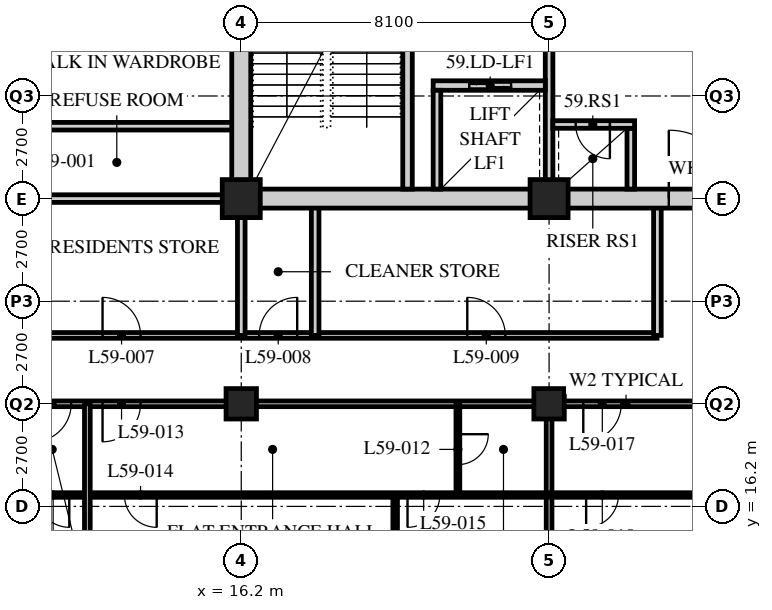
"""IFC4 building model, lengths in metres.
Left out: names, types, materials, properties, quantities, classifications, styles, units other than length and angle.
Written with IfcOpenShell. Run it as: python <this file> out.ifc"""

import sys

from ifc_helpers import new_model, si_unit, direction, frame, frame_2d, origin, origin_2d, place, context, subcontext, project, spatial, rectangle, hollow_rectangle, extrude, element, fill, save


model = new_model("IFC4")
c1 = context("Model", 3, precision=1e-05, world=origin(), true_north=direction((0.0, 1.0)))
c2 = subcontext(c1, "Body", "Model", "MODEL_VIEW")
j1 = project(units=[si_unit("LENGTHUNIT", "METRE"), si_unit("PLANEANGLEUNIT", "RADIAN")], contexts=[c1])
p1 = place(None, origin())
s1 = spatial("IfcSite", under=j1, at=p1, CompositionType="ELEMENT")
p2 = place(p1, origin())
s2 = spatial("IfcBuilding", under=s1, at=p2, CompositionType="ELEMENT")
p3 = place(p2, frame((0.0, 0.0, 228.0)))
s3 = spatial("IfcBuildingStorey", under=s2, at=p3, CompositionType="ELEMENT", Elevation=228.0)
p4 = place(p3, frame((16.2, 18.9, 0.0), z_axis=(0.0, 0.0, 1.0), x_axis=(1.0, 0.0, 0.0)))
e1 = element("IfcColumn", 1, at=p4, inside=s3, PredefinedType="COLUMN", context=c2, shape_type="SweptSolid", body=[
    extrude(hollow_rectangle(XDim=0.8, YDim=0.8, WallThickness=0.08, at=origin_2d()), origin(), (0.0, 0.0, 1.0), 3.6),
])
p5 = place(p3, frame((16.2, 24.3, 0.0), z_axis=(0.0, 0.0, 1.0), x_axis=(1.0, 0.0, 0.0)))
e2 = element("IfcColumn", 2, at=p5, inside=s3, PredefinedType="COLUMN", context=c2, shape_type="SweptSolid", body=[
    extrude(hollow_rectangle(XDim=1.0, YDim=1.0, WallThickness=0.1, at=origin_2d()), origin(), (0.0, 0.0, 1.0), 3.6),
])
p6 = place(p3, frame((24.3, 18.9, 0.0), z_axis=(0.0, 0.0, 1.0), x_axis=(1.0, 0.0, 0.0)))
e3 = element("IfcColumn", 3, at=p6, inside=s3, PredefinedType="COLUMN", context=c2, shape_type="SweptSolid", body=[
    extrude(hollow_rectangle(XDim=0.8, YDim=0.8, WallThickness=0.08, at=origin_2d()), origin(), (0.0, 0.0, 1.0), 3.6),
])
p7 = place(p3, frame((24.3, 24.3, 0.0), z_axis=(0.0, 0.0, 1.0), x_axis=(1.0, 0.0, 0.0)))
e4 = element("IfcColumn", 4, at=p7, inside=s3, PredefinedType="COLUMN", context=c2, shape_type="SweptSolid", body=[
    extrude(hollow_rectangle(XDim=1.0, YDim=1.0, WallThickness=0.1, at=origin_2d()), origin(), (0.0, 0.0, 1.0), 3.6),
])
p8 = place(p3, frame((8.1, 18.9, 0.0), z_axis=(0.0, 0.0, 1.0), x_axis=(1.0, 0.0, 0.0)))
e5 = element("IfcWall", 5, at=p8, inside=s3, PredefinedType="PARTITIONING", context=c2, shape_type="SweptSolid", body=[
    extrude(rectangle(XDim=36.45, YDim=0.15, at=frame_2d((18.225, 0.0))), origin(), (0.0, 0.0, 1.0), 2.628),
])
p9 = place(p8, frame((4.45, 0.0, 0.0)))
e6 = element("IfcOpeningElement", 6, at=p9, cuts=e5, PredefinedType="OPENING", context=c2, shape_type="SweptSolid", body=[
    extrude(rectangle(XDim=1.0, YDim=2.1, at=frame_2d((0.5, 1.05))), frame((0.0, 0.085, 0.0), z_axis=(0.0, -1.0, 0.0), x_axis=(1.0, 0.0, 0.0)), (0.0, 0.0, 1.0), 0.17),
])
p10 = place(p8, frame((17.1, 0.0, 0.0)))
e7 = element("IfcOpeningElement", 7, at=p10, cuts=e5, PredefinedType="OPENING", context=c2, shape_type="SweptSolid", body=[
    extrude(rectangle(XDim=1.0, YDim=2.1, at=frame_2d((0.5, 1.05))), frame((0.0, 0.085, 0.0), z_axis=(0.0, -1.0, 0.0), x_axis=(1.0, 0.0, 0.0)), (0.0, 0.0, 1.0), 0.17),
])
p11 = place(p8, frame((29.05, 0.0, 0.0)))
e8 = element("IfcOpeningElement", 8, at=p11, cuts=e5, PredefinedType="OPENING", context=c2, shape_type="SweptSolid", body=[
    extrude(rectangle(XDim=1.0, YDim=2.1, at=frame_2d((0.5, 1.05))), frame((0.0, 0.085, 0.0), z_axis=(0.0, -1.0, 0.0), x_axis=(1.0, 0.0, 0.0)), (0.0, 0.0, 1.0), 0.17),
])
p12 = place(p8, frame((2.625, 0.0, 0.0)))
e9 = element("IfcOpeningElement", 9, at=p12, cuts=e5, PredefinedType="OPENING", context=c2, shape_type="SweptSolid", body=[
    extrude(rectangle(XDim=1.0, YDim=2.1, at=frame_2d((0.5, 1.05))), frame((0.0, 0.085, 0.0), z_axis=(0.0, -1.0, 0.0), x_axis=(1.0, 0.0, 0.0)), (0.0, 0.0, 1.0), 0.17),
])
p13 = place(p8, frame((33.925, 0.0, 0.0)))
e10 = element("IfcOpeningElement", 10, at=p13, cuts=e5, PredefinedType="OPENING", context=c2, shape_type="SweptSolid", body=[
    extrude(rectangle(XDim=1.0, YDim=2.1, at=frame_2d((0.5, 1.05))), frame((0.0, 0.085, 0.0), z_axis=(0.0, -1.0, 0.0), x_axis=(1.0, 0.0, 0.0)), (0.0, 0.0, 1.0), 0.17),
])
p14 = place(p3, frame((9.9, 20.7, 0.0), z_axis=(0.0, 0.0, 1.0), x_axis=(1.0, 0.0, 0.0)))
e11 = element("IfcWall", 11, at=p14, inside=s3, PredefinedType="PARTITIONING", context=c2, shape_type="SweptSolid", body=[
    extrude(rectangle(XDim=17.24, YDim=0.15, at=frame_2d((8.62, 0.0))), origin(), (0.0, 0.0, 1.0), 3.39),
])
p15 = place(p14, frame((2.65, 0.0, 0.0)))
e12 = element("IfcOpeningElement", 12, at=p15, cuts=e11, PredefinedType="OPENING", context=c2, shape_type="SweptSolid", body=[
    extrude(rectangle(XDim=1.0, YDim=2.1, at=frame_2d((0.5, 1.05))), frame((0.0, 0.085, 0.0), z_axis=(0.0, -1.0, 0.0), x_axis=(1.0, 0.0, 0.0)), (0.0, 0.0, 1.0), 0.17),
])
p16 = place(p14, frame((6.772, 0.0, 0.0)))
e13 = element("IfcOpeningElement", 13, at=p16, cuts=e11, PredefinedType="OPENING", context=c2, shape_type="SweptSolid", body=[
    extrude(rectangle(XDim=1.0, YDim=2.1, at=frame_2d((0.5, 1.05))), frame((0.0, 0.085, 0.0), z_axis=(0.0, -1.0, 0.0), x_axis=(1.0, 0.0, 0.0)), (0.0, 0.0, 1.0), 0.17),
])
p17 = place(p14, frame((12.247, 0.0, 0.0)))
e14 = element("IfcOpeningElement", 14, at=p17, cuts=e11, PredefinedType="OPENING", context=c2, shape_type="SweptSolid", body=[
    extrude(rectangle(XDim=1.0, YDim=2.1, at=frame_2d((0.5, 1.05))), frame((0.0, 0.085, 0.0), z_axis=(0.0, -1.0, 0.0), x_axis=(1.0, 0.0, 0.0)), (0.0, 0.0, 1.0), 0.17),
])
p18 = place(p3, frame((9.9, 26.205, 0.0), z_axis=(0.0, 0.0, 1.0), x_axis=(1.0, 0.0, 0.0)))
e15 = element("IfcWall", 15, at=p18, inside=s3, PredefinedType="SOLIDWALL", context=c2, shape_type="SweptSolid", body=[
    extrude(rectangle(XDim=6.3, YDim=0.2, at=frame_2d((3.15, 0.0))), origin(), (0.0, 0.0, 1.0), 3.39),
])
p19 = place(p3, frame((16.2, 20.7, 0.0), z_axis=(0.0, 0.0, 1.0), x_axis=(0.0, 1.0, 0.0)))
e16 = element("IfcWall", 16, at=p19, inside=s3, PredefinedType="SOLIDWALL", context=c2, shape_type="SweptSolid", body=[
    extrude(rectangle(XDim=3.6, YDim=0.2, at=frame_2d((1.8, 0.0))), origin(), (0.0, 0.0, 1.0), 2.628),
])
for number, where, z_axis, x_axis in (
    (17, (18.144, 20.7, 0.0), (0.0, 0.0, 1.0), (0.0, 1.0, 0.0)),
    (18, (27.15, 20.7, 0.0), (0.0, 0.0, 1.0), (0.0, 1.0, 0.0)),
):
    element("IfcWall", number, at=place(p3, frame(where, z_axis=z_axis, x_axis=x_axis)), inside=s3, PredefinedType="SOLIDWALL", context=c2, shape_type="SweptSolid", body=[
        extrude(rectangle(XDim=3.6, YDim=0.2, at=frame_2d((1.8, 0.0))), origin(), (0.0, 0.0, 1.0), 3.39),
    ])
p20 = place(p3, frame((9.9, 24.3, 0.0), z_axis=(0.0, 0.0, 1.0), x_axis=(1.0, 0.0, 0.0)))
e19 = element("IfcWall", 19, at=p20, inside=s3, PredefinedType="SOLIDWALL", context=c2, shape_type="SweptSolid", body=[
    extrude(rectangle(XDim=6.3, YDim=0.2, at=frame_2d((3.15, 0.0))), origin(), (0.0, 0.0, 1.0), 3.39),
])
p21 = place(p3, frame((21.9, 18.9, 0.0), z_axis=(0.0, 0.0, 1.0), x_axis=(0.0, -1.0, 0.0)))
e20 = element("IfcWall", 20, at=p21, inside=s3, PredefinedType="PARTITIONING", context=c2, shape_type="SweptSolid", body=[
    extrude(rectangle(XDim=2.4, YDim=0.1, at=frame_2d((1.2, 0.0))), origin(), (0.0, 0.0, 1.0), 3.39),
])
p22 = place(p21, frame((0.8, 0.0, 0.0)))
e21 = element("IfcOpeningElement", 21, at=p22, cuts=e20, PredefinedType="OPENING", context=c2, shape_type="SweptSolid", body=[
    extrude(rectangle(XDim=0.8, YDim=2.1, at=frame_2d((0.4, 1.05))), frame((0.0, 0.06, 0.0), z_axis=(0.0, -1.0, 0.0), x_axis=(1.0, 0.0, 0.0)), (0.0, 0.0, 1.0), 0.12),
])
p23 = place(p3, frame((20.25, 16.5, 0.0), z_axis=(0.0, 0.0, 1.0), x_axis=(0.0, -1.0, 0.0)))
e22 = element("IfcWall", 22, at=p23, inside=s3, PredefinedType="PARTITIONING", context=c2, shape_type="SweptSolid", body=[
    extrude(rectangle(XDim=5.4, YDim=0.12, at=frame_2d((2.7, 0.0))), origin(), (0.0, 0.0, 1.0), 3.39),
])
p24 = place(p3, frame((24.3, 18.9, 0.0), z_axis=(0.0, 0.0, 1.0), x_axis=(0.0, -1.0, 0.0)))
e23 = element("IfcWall", 23, at=p24, inside=s3, PredefinedType="PARTITIONING", context=c2, shape_type="SweptSolid", body=[
    extrude(rectangle(XDim=7.8, YDim=0.15, at=frame_2d((3.9, 0.0))), origin(), (0.0, 0.0, 1.0), 2.628),
])
p25 = place(p3, frame((8.1, 16.5, 0.0), z_axis=(0.0, 0.0, 1.0), x_axis=(1.0, 0.0, 0.0)))
e24 = element("IfcWall", 24, at=p25, inside=s3, PredefinedType="PARTITIONING", context=c2, shape_type="SweptSolid", body=[
    extrude(rectangle(XDim=28.35, YDim=0.12, at=frame_2d((14.175, 0.0))), origin(), (0.0, 0.0, 1.0), 3.39),
])
p26 = place(p25, frame((5.025, 0.0, 0.0)))
e25 = element("IfcOpeningElement", 25, at=p26, cuts=e24, PredefinedType="OPENING", context=c2, shape_type="SweptSolid", body=[
    extrude(rectangle(XDim=0.85, YDim=2.1, at=frame_2d((0.425, 1.05))), frame((0.0, 0.07, 0.0), z_axis=(0.0, -1.0, 0.0), x_axis=(1.0, 0.0, 0.0)), (0.0, 0.0, 1.0), 0.14),
])
p27 = place(p25, frame((12.475, 0.0, 0.0)))
e26 = element("IfcOpeningElement", 26, at=p27, cuts=e24, PredefinedType="OPENING", context=c2, shape_type="SweptSolid", body=[
    extrude(rectangle(XDim=0.85, YDim=2.1, at=frame_2d((0.425, 1.05))), frame((0.0, 0.07, 0.0), z_axis=(0.0, -1.0, 0.0), x_axis=(1.0, 0.0, 0.0)), (0.0, 0.0, 1.0), 0.14),
])
p28 = place(p25, frame((17.175, 0.0, 0.0)))
e27 = element("IfcOpeningElement", 27, at=p28, cuts=e24, PredefinedType="OPENING", context=c2, shape_type="SweptSolid", body=[
    extrude(rectangle(XDim=0.85, YDim=2.1, at=frame_2d((0.425, 1.05))), frame((0.0, 0.07, 0.0), z_axis=(0.0, -1.0, 0.0), x_axis=(1.0, 0.0, 0.0)), (0.0, 0.0, 1.0), 0.14),
])
p29 = place(p25, frame((24.625, 0.0, 0.0)))
e28 = element("IfcOpeningElement", 28, at=p29, cuts=e24, PredefinedType="OPENING", context=c2, shape_type="SweptSolid", body=[
    extrude(rectangle(XDim=0.85, YDim=2.1, at=frame_2d((0.425, 1.05))), frame((0.0, 0.07, 0.0), z_axis=(0.0, -1.0, 0.0), x_axis=(1.0, 0.0, 0.0)), (0.0, 0.0, 1.0), 0.14),
])
p30 = place(p25, frame((2.725, 0.0, 0.0)))
e29 = element("IfcOpeningElement", 29, at=p30, cuts=e24, PredefinedType="OPENING", context=c2, shape_type="SweptSolid", body=[
    extrude(rectangle(XDim=0.85, YDim=2.1, at=frame_2d((0.425, 1.05))), frame((0.0, 0.07, 0.0), z_axis=(0.0, -1.0, 0.0), x_axis=(1.0, 0.0, 0.0)), (0.0, 0.0, 1.0), 0.14),
])
p31 = place(p3, frame((12.15, 18.9, 0.0), z_axis=(0.0, 0.0, 1.0), x_axis=(0.0, -1.0, 0.0)))
e30 = element("IfcWall", 30, at=p31, inside=s3, PredefinedType="PARTITIONING", context=c2, shape_type="SweptSolid", body=[
    extrude(rectangle(XDim=7.8, YDim=0.15, at=frame_2d((3.9, 0.0))), origin(), (0.0, 0.0, 1.0), 3.39),
])
p32 = place(p3, frame((15.95, 24.3, 0.0), z_axis=(0.0, 0.0, 1.0), x_axis=(1.0, 0.0, 0.0)))
e31 = element("IfcWall", 31, at=p32, inside=s3, PredefinedType="SOLIDWALL", context=c2, shape_type="SweptSolid", body=[
    extrude(rectangle(XDim=24.8, YDim=0.5, at=frame_2d((12.4, 0.0))), origin(), (0.0, 0.0, 1.0), 2.628),
])
p33 = place(p32, frame((11.5, 0.0, 0.0)))
e32 = element("IfcOpeningElement", 32, at=p33, cuts=e31, PredefinedType="OPENING", context=c2, shape_type="SweptSolid", body=[
    extrude(rectangle(XDim=1.8, YDim=2.4, at=frame_2d((0.9, 1.2))), frame((0.0, 0.26, 0.0), z_axis=(0.0, -1.0, 0.0), x_axis=(1.0, 0.0, 0.0)), (0.0, 0.0, 1.0), 0.52),
])
p34 = place(p3, frame((16.2, 24.55, 0.0), z_axis=(0.0, 0.0, 1.0), x_axis=(0.0, 1.0, 0.0)))
e33 = element("IfcWall", 33, at=p34, inside=s3, PredefinedType="SOLIDWALL", context=c2, shape_type="SweptSolid", body=[
    extrude(rectangle(XDim=15.7, YDim=0.5, at=frame_2d((7.85, 0.0))), origin(), (0.0, 0.0, 1.0), 2.628),
])
p35 = place(p3, frame((24.3, 24.55, 0.0), z_axis=(0.0, 0.0, 1.0), x_axis=(0.0, 1.0, 0.0)))
e34 = element("IfcWall", 34, at=p35, inside=s3, PredefinedType="SOLIDWALL", context=c2, shape_type="SweptSolid", body=[
    extrude(rectangle(XDim=7.75, YDim=0.2, at=frame_2d((3.875, 0.0))), origin(), (0.0, 0.0, 1.0), 2.778),
])
p36 = place(p35, frame((4.6, 0.0, 0.0)))
e35 = element("IfcOpeningElement", 35, at=p36, cuts=e34, PredefinedType="OPENING", context=c2, shape_type="SweptSolid", body=[
    extrude(rectangle(XDim=1.2, YDim=2.1, at=frame_2d((0.6, 1.05))), frame((0.0, 0.11, 0.0), z_axis=(0.0, -1.0, 0.0), x_axis=(1.0, 0.0, 0.0)), (0.0, 0.0, 1.0), 0.22),
])
p37 = place(p3, frame((20.575, 24.55, 0.0), z_axis=(0.0, 0.0, 1.0), x_axis=(0.0, 1.0, 0.0)))
e36 = element("IfcWall", 36, at=p37, inside=s3, PredefinedType="SOLIDWALL", context=c2, shape_type="SweptSolid", body=[
    extrude(rectangle(XDim=7.75, YDim=0.25, at=frame_2d((3.875, 0.0))), origin(), (0.0, 0.0, 1.0), 3.39),
])
p38 = place(p37, frame((6.2, 0.0, 0.0)))
e37 = element("IfcOpeningElement", 37, at=p38, cuts=e36, PredefinedType="OPENING", context=c2, shape_type="SweptSolid", body=[
    extrude(rectangle(XDim=1.2, YDim=2.1, at=frame_2d((0.6, 1.05))), frame((0.0, 0.135, 0.0), z_axis=(0.0, -1.0, 0.0), x_axis=(1.0, 0.0, 0.0)), (0.0, 0.0, 1.0), 0.27),
])
p39 = place(p3, frame((21.25, 27.275, 0.0), z_axis=(0.0, 0.0, 1.0), x_axis=(1.0, 0.0, 0.0)))
e38 = element("IfcWall", 38, at=p39, inside=s3, PredefinedType="SOLIDWALL", context=c2, shape_type="SweptSolid", body=[
    extrude(rectangle(XDim=2.95, YDim=0.25, at=frame_2d((1.475, 0.0))), origin(), (0.0, 0.0, 1.0), 3.39),
])
p40 = place(p39, frame((0.95, 0.0, 0.0)))
e39 = element("IfcOpeningElement", 39, at=p40, cuts=e38, PredefinedType="OPENING", context=c2, shape_type="SweptSolid", body=[
    extrude(rectangle(XDim=1.1, YDim=2.4, at=frame_2d((0.55, 1.2))), frame((0.0, 0.135, 0.0), z_axis=(0.0, -1.0, 0.0), x_axis=(1.0, 0.0, 0.0)), (0.0, 0.0, 1.0), 0.27),
])
p41 = place(p3, frame((21.35, 24.55, 0.0), z_axis=(0.0, 0.0, 1.0), x_axis=(0.0, 1.0, 0.0)))
e40 = element("IfcWall", 40, at=p41, inside=s3, PredefinedType="SOLIDWALL", context=c2, shape_type="SweptSolid", body=[
    extrude(rectangle(XDim=2.6, YDim=0.2, at=frame_2d((1.3, 0.0))), origin(), (0.0, 0.0, 1.0), 3.39),
])
p42 = place(p3, frame((26.45, 24.55, 0.0), z_axis=(0.0, 0.0, 1.0), x_axis=(0.0, 1.0, 0.0)))
e41 = element("IfcWall", 41, at=p42, inside=s3, PredefinedType="SOLIDWALL", context=c2, shape_type="SweptSolid", body=[
    extrude(rectangle(XDim=1.6, YDim=0.2, at=frame_2d((0.8, 0.0))), origin(), (0.0, 0.0, 1.0), 3.39),
])
p43 = place(p3, frame((24.4, 26.25, 0.0), z_axis=(0.0, 0.0, 1.0), x_axis=(1.0, 0.0, 0.0)))
e42 = element("IfcWall", 42, at=p43, inside=s3, PredefinedType="SOLIDWALL", context=c2, shape_type="SweptSolid", body=[
    extrude(rectangle(XDim=2.15, YDim=0.2, at=frame_2d((1.075, 0.0))), origin(), (0.0, 0.0, 1.0), 3.39),
])
p44 = place(p43, frame((0.6, 0.0, 0.0)))
e43 = element("IfcOpeningElement", 43, at=p44, cuts=e42, PredefinedType="OPENING", context=c2, shape_type="SweptSolid", body=[
    extrude(rectangle(XDim=0.9, YDim=2.1, at=frame_2d((0.45, 1.05))), frame((0.0, 0.11, 0.0), z_axis=(0.0, -1.0, 0.0), x_axis=(1.0, 0.0, 0.0)), (0.0, 0.0, 1.0), 0.22),
])
p45 = place(p15, origin())
e44 = element("IfcDoor", 44, at=p45, inside=s3, OperationType="SINGLE_SWING_LEFT", PredefinedType="DOOR", context=c2, shape_type="SweptSolid", body=[
    extrude(rectangle(XDim=1.0, YDim=2.1, at=frame_2d((0.5, 1.05))), frame((0.0, 0.025, 0.0), z_axis=(0.0, -1.0, 0.0), x_axis=(1.0, 0.0, 0.0)), (0.0, 0.0, 1.0), 0.05),
])
fill(e12, e44)
p46 = place(p16, origin())
e45 = element("IfcDoor", 45, at=p46, inside=s3, OperationType="SINGLE_SWING_RIGHT", PredefinedType="DOOR", context=c2, shape_type="SweptSolid", body=[
    extrude(rectangle(XDim=1.0, YDim=2.1, at=frame_2d((0.5, 1.05))), frame((0.0, 0.025, 0.0), z_axis=(0.0, -1.0, 0.0), x_axis=(1.0, 0.0, 0.0)), (0.0, 0.0, 1.0), 0.05),
])
fill(e13, e45)
p47 = place(p17, origin())
e46 = element("IfcDoor", 46, at=p47, inside=s3, OperationType="SINGLE_SWING_LEFT", PredefinedType="DOOR", context=c2, shape_type="SweptSolid", body=[
    extrude(rectangle(XDim=1.0, YDim=2.1, at=frame_2d((0.5, 1.05))), frame((0.0, 0.025, 0.0), z_axis=(0.0, -1.0, 0.0), x_axis=(1.0, 0.0, 0.0)), (0.0, 0.0, 1.0), 0.05),
])
fill(e14, e46)
p48 = place(p22, origin())
e47 = element("IfcDoor", 47, at=p48, inside=s3, OperationType="SINGLE_SWING_LEFT", PredefinedType="DOOR", context=c2, shape_type="SweptSolid", body=[
    extrude(rectangle(XDim=0.8, YDim=2.1, at=frame_2d((0.4, 1.05))), frame((0.0, 0.025, 0.0), z_axis=(0.0, -1.0, 0.0), x_axis=(1.0, 0.0, 0.0)), (0.0, 0.0, 1.0), 0.05),
])
fill(e21, e47)
p49 = place(p9, origin())
e48 = element("IfcDoor", 48, at=p49, inside=s3, OperationType="SINGLE_SWING_RIGHT", PredefinedType="DOOR", context=c2, shape_type="SweptSolid", body=[
    extrude(rectangle(XDim=1.0, YDim=2.1, at=frame_2d((0.5, 1.05))), frame((0.0, 0.025, 0.0), z_axis=(0.0, -1.0, 0.0), x_axis=(1.0, 0.0, 0.0)), (0.0, 0.0, 1.0), 0.05),
])
fill(e6, e48)
p50 = place(p26, origin())
e49 = element("IfcDoor", 49, at=p50, inside=s3, OperationType="SINGLE_SWING_LEFT", PredefinedType="DOOR", context=c2, shape_type="SweptSolid", body=[
    extrude(rectangle(XDim=0.85, YDim=2.1, at=frame_2d((0.425, 1.05))), frame((0.0, 0.025, 0.0), z_axis=(0.0, -1.0, 0.0), x_axis=(1.0, 0.0, 0.0)), (0.0, 0.0, 1.0), 0.05),
])
fill(e25, e49)
p51 = place(p27, origin())
e50 = element("IfcDoor", 50, at=p51, inside=s3, OperationType="SINGLE_SWING_RIGHT", PredefinedType="DOOR", context=c2, shape_type="SweptSolid", body=[
    extrude(rectangle(XDim=0.85, YDim=2.1, at=frame_2d((0.425, 1.05))), frame((0.0, 0.025, 0.0), z_axis=(0.0, -1.0, 0.0), x_axis=(1.0, 0.0, 0.0)), (0.0, 0.0, 1.0), 0.05),
])
fill(e26, e50)
p52 = place(p10, origin())
e51 = element("IfcDoor", 51, at=p52, inside=s3, OperationType="SINGLE_SWING_RIGHT", PredefinedType="DOOR", context=c2, shape_type="SweptSolid", body=[
    extrude(rectangle(XDim=1.0, YDim=2.1, at=frame_2d((0.5, 1.05))), frame((0.0, 0.025, 0.0), z_axis=(0.0, -1.0, 0.0), x_axis=(1.0, 0.0, 0.0)), (0.0, 0.0, 1.0), 0.05),
])
fill(e7, e51)
p53 = place(p28, origin())
e52 = element("IfcDoor", 52, at=p53, inside=s3, OperationType="SINGLE_SWING_RIGHT", PredefinedType="DOOR", context=c2, shape_type="SweptSolid", body=[
    extrude(rectangle(XDim=0.85, YDim=2.1, at=frame_2d((0.425, 1.05))), frame((0.0, 0.025, 0.0), z_axis=(0.0, -1.0, 0.0), x_axis=(1.0, 0.0, 0.0)), (0.0, 0.0, 1.0), 0.05),
])
fill(e27, e52)
p54 = place(p12, origin())
e53 = element("IfcDoor", 53, at=p54, inside=s3, OperationType="SINGLE_SWING_RIGHT", PredefinedType="DOOR", context=c2, shape_type="SweptSolid", body=[
    extrude(rectangle(XDim=1.0, YDim=2.1, at=frame_2d((0.5, 1.05))), frame((0.0, 0.025, 0.0), z_axis=(0.0, -1.0, 0.0), x_axis=(1.0, 0.0, 0.0)), (0.0, 0.0, 1.0), 0.05),
])
fill(e9, e53)
p55 = place(p30, origin())
e54 = element("IfcDoor", 54, at=p55, inside=s3, OperationType="SINGLE_SWING_LEFT", PredefinedType="DOOR", context=c2, shape_type="SweptSolid", body=[
    extrude(rectangle(XDim=0.85, YDim=2.1, at=frame_2d((0.425, 1.05))), frame((0.0, 0.025, 0.0), z_axis=(0.0, -1.0, 0.0), x_axis=(1.0, 0.0, 0.0)), (0.0, 0.0, 1.0), 0.05),
])
fill(e29, e54)
p56 = place(p44, origin())
e55 = element("IfcDoor", 55, at=p56, inside=s3, OperationType="SINGLE_SWING_LEFT", PredefinedType="DOOR", context=c2, shape_type="SweptSolid", body=[
    extrude(rectangle(XDim=0.9, YDim=2.1, at=frame_2d((0.45, 1.05))), frame((0.0, 0.025, 0.0), z_axis=(0.0, -1.0, 0.0), x_axis=(1.0, 0.0, 0.0)), (0.0, 0.0, 1.0), 0.05),
])
fill(e43, e55)
p57 = place(p40, origin())
e56 = element("IfcDoor", 56, at=p57, inside=s3, OperationType="DOUBLE_DOOR_SLIDING", PredefinedType="DOOR", context=c2, shape_type="SweptSolid", body=[
    extrude(rectangle(XDim=1.1, YDim=2.4, at=frame_2d((0.55, 1.2))), frame((0.0, 0.025, 0.0), z_axis=(0.0, -1.0, 0.0), x_axis=(1.0, 0.0, 0.0)), (0.0, 0.0, 1.0), 0.05),
])
fill(e39, e56)
p58 = place(p33, origin())
e57 = element("IfcDoor", 57, at=p58, inside=s3, OperationType="DOUBLE_DOOR_SINGLE_SWING", PredefinedType="DOOR", context=c2, shape_type="SweptSolid", body=[
    extrude(rectangle(XDim=1.8, YDim=2.4, at=frame_2d((0.9, 1.2))), frame((0.0, 0.025, 0.0), z_axis=(0.0, -1.0, 0.0), x_axis=(1.0, 0.0, 0.0)), (0.0, 0.0, 1.0), 0.05),
])
fill(e32, e57)
save(model, sys.argv[1])
